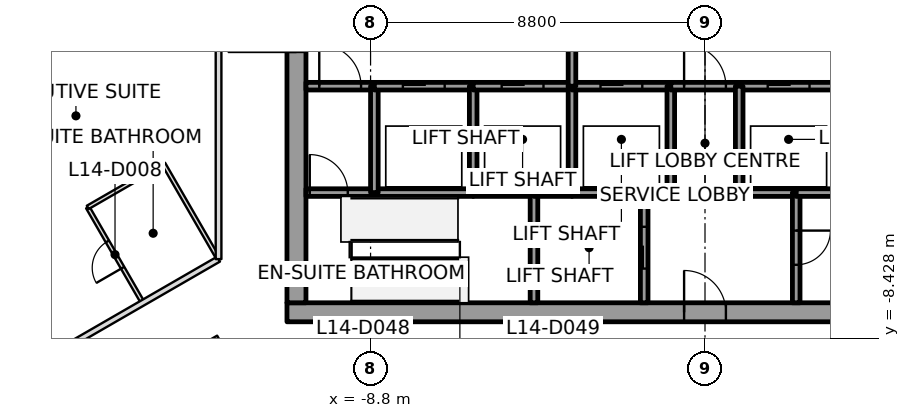
"""IFC4 building model, lengths in metres.
Left out: names, types, materials, properties, quantities, classifications, styles, units other than length and angle.
Written with IfcOpenShell. Run it as: python <this file> out.ifc"""

import sys

from ifc_helpers import new_model, si_unit, direction, frame, frame_2d, origin, place, context, subcontext, project, spatial, rectangle, extrude, element, fill, save


model = new_model("IFC4")
c1 = context("Model", 3, precision=1e-05, world=origin(), true_north=direction((0.0, 1.0)))
c2 = subcontext(c1, "Body", "Model", "MODEL_VIEW")
j1 = project(units=[si_unit("LENGTHUNIT", "METRE"), si_unit("PLANEANGLEUNIT", "RADIAN")], contexts=[c1])
p1 = place(None, origin())
s1 = spatial("IfcSite", under=j1, at=p1, CompositionType="ELEMENT")
p2 = place(p1, origin())
s2 = spatial("IfcBuilding", under=s1, at=p2, CompositionType="ELEMENT")
p3 = place(p2, frame((0.0, 0.0, 73.9)))
s3 = spatial("IfcBuildingStorey", under=s2, at=p3, CompositionType="ELEMENT", Elevation=73.9)
p4 = place(p3, frame((-11.0, -7.75, 0.0), z_axis=(0.0, 0.0, 1.0), x_axis=(1.0, 0.0, 0.0)))
e1 = element("IfcWall", 1, at=p4, inside=s3, PredefinedType="SHEAR", context=c2, shape_type="SweptSolid", body=[
    extrude(rectangle(XDim=22.0, YDim=0.5, at=frame_2d((11.0, 0.0))), origin(), (0.0, 0.0, 1.0), 3.7),
])
p5 = place(p4, frame((10.45, 0.0, 0.0)))
e2 = element("IfcOpeningElement", 2, at=p5, cuts=e1, PredefinedType="OPENING", context=c2, shape_type="SweptSolid", body=[
    extrude(rectangle(XDim=1.1, YDim=2.1, at=frame_2d((0.55, 1.05))), frame((0.0, 0.25, 0.0), z_axis=(0.0, -1.0, 0.0), x_axis=(1.0, 0.0, 0.0)), (0.0, 0.0, 1.0), 0.5),
])
p6 = place(p3, frame((-10.75, -7.5, 0.0), z_axis=(0.0, 0.0, 1.0), x_axis=(0.0, 1.0, 0.0)))
e3 = element("IfcWall", 3, at=p6, inside=s3, PredefinedType="SHEAR", context=c2, shape_type="SweptSolid", body=[
    extrude(rectangle(XDim=15.0, YDim=0.5, at=frame_2d((7.5, 0.0))), origin(), (0.0, 0.0, 1.0), 3.7),
])
p7 = place(p6, frame((6.6, 0.0, 0.0)))
e4 = element("IfcOpeningElement", 4, at=p7, cuts=e3, PredefinedType="OPENING", context=c2, shape_type="SweptSolid", body=[
    extrude(rectangle(XDim=1.8, YDim=2.1, at=frame_2d((0.9, 1.05))), frame((0.0, 0.25, 0.0), z_axis=(0.0, -1.0, 0.0), x_axis=(1.0, 0.0, 0.0)), (0.0, 0.0, 1.0), 0.5),
])
p8 = place(p3, frame((-10.5, -4.6, 0.0), z_axis=(0.0, 0.0, 1.0), x_axis=(1.0, 0.0, 0.0)))
e5 = element("IfcWall", 5, at=p8, inside=s3, PredefinedType="SOLIDWALL", context=c2, shape_type="SweptSolid", body=[
    extrude(rectangle(XDim=1.8, YDim=0.2, at=frame_2d((0.9, 0.0))), origin(), (0.0, 0.0, 1.0), 3.55),
])
p9 = place(p8, frame((0.1, 0.0, 0.0)))
e6 = element("IfcOpeningElement", 6, at=p9, cuts=e5, PredefinedType="OPENING", context=c2, shape_type="SweptSolid", body=[
    extrude(rectangle(XDim=1.0, YDim=2.1, at=frame_2d((0.5, 1.05))), frame((0.0, 0.1, 0.0), z_axis=(0.0, -1.0, 0.0), x_axis=(1.0, 0.0, 0.0)), (0.0, 0.0, 1.0), 0.2),
])
p10 = place(p3, frame((-10.5, -1.8, 0.0), z_axis=(0.0, 0.0, 1.0), x_axis=(1.0, 0.0, 0.0)))
e7 = element("IfcWall", 7, at=p10, inside=s3, PredefinedType="SOLIDWALL", context=c2, shape_type="SweptSolid", body=[
    extrude(rectangle(XDim=1.8, YDim=0.2, at=frame_2d((0.9, 0.0))), origin(), (0.0, 0.0, 1.0), 3.55),
])
p11 = place(p10, frame((0.35, 0.0, 0.0)))
e8 = element("IfcOpeningElement", 8, at=p11, cuts=e7, PredefinedType="OPENING", context=c2, shape_type="SweptSolid", body=[
    extrude(rectangle(XDim=1.1, YDim=2.1, at=frame_2d((0.55, 1.05))), frame((0.0, 0.1, 0.0), z_axis=(0.0, -1.0, 0.0), x_axis=(1.0, 0.0, 0.0)), (0.0, 0.0, 1.0), 0.2),
])
p12 = place(p3, frame((-8.7, -4.6, 0.0), z_axis=(0.0, 0.0, 1.0), x_axis=(1.0, 0.0, 0.0)))
e9 = element("IfcWall", 9, at=p12, inside=s3, PredefinedType="SOLIDWALL", context=c2, shape_type="SweptSolid", body=[
    extrude(rectangle(XDim=2.6, YDim=0.2, at=frame_2d((1.3, 0.0))), origin(), (0.0, 0.0, 1.0), 3.55),
])
p13 = place(p3, frame((-8.7, -4.6, 0.0), z_axis=(0.0, 0.0, 1.0), x_axis=(0.0, 1.0, 0.0)))
e10 = element("IfcWall", 10, at=p13, inside=s3, PredefinedType="SOLIDWALL", context=c2, shape_type="SweptSolid", body=[
    extrude(rectangle(XDim=2.8, YDim=0.2, at=frame_2d((1.4, 0.0))), origin(), (0.0, 0.0, 1.0), 3.55),
])
p14 = place(p3, frame((-8.7, -1.8, 0.0), z_axis=(0.0, 0.0, 1.0), x_axis=(1.0, 0.0, 0.0)))
e11 = element("IfcWall", 11, at=p14, inside=s3, PredefinedType="SOLIDWALL", context=c2, shape_type="SweptSolid", body=[
    extrude(rectangle(XDim=2.6, YDim=0.2, at=frame_2d((1.3, 0.0))), origin(), (0.0, 0.0, 1.0), 3.55),
])
p15 = place(p14, frame((0.75, 0.0, 0.0)))
e12 = element("IfcOpeningElement", 12, at=p15, cuts=e11, PredefinedType="OPENING", context=c2, shape_type="SweptSolid", body=[
    extrude(rectangle(XDim=1.1, YDim=2.1, at=frame_2d((0.55, 1.05))), frame((0.0, 0.1, 0.0), z_axis=(0.0, -1.0, 0.0), x_axis=(1.0, 0.0, 0.0)), (0.0, 0.0, 1.0), 0.2),
])
p16 = place(p3, frame((-6.1, -4.6, 0.0), z_axis=(0.0, 0.0, 1.0), x_axis=(1.0, 0.0, 0.0)))
e13 = element("IfcWall", 13, at=p16, inside=s3, PredefinedType="SOLIDWALL", context=c2, shape_type="SweptSolid", body=[
    extrude(rectangle(XDim=1.6, YDim=0.2, at=frame_2d((0.8, 0.0))), origin(), (0.0, 0.0, 1.0), 3.55),
])
p17 = place(p3, frame((-6.1, -4.6, 0.0), z_axis=(0.0, 0.0, 1.0), x_axis=(0.0, 1.0, 0.0)))
e14 = element("IfcWall", 14, at=p17, inside=s3, PredefinedType="SOLIDWALL", context=c2, shape_type="SweptSolid", body=[
    extrude(rectangle(XDim=2.8, YDim=0.2, at=frame_2d((1.4, 0.0))), origin(), (0.0, 0.0, 1.0), 3.55),
])
p18 = place(p3, frame((-6.1, -1.8, 0.0), z_axis=(0.0, 0.0, 1.0), x_axis=(1.0, 0.0, 0.0)))
e15 = element("IfcWall", 15, at=p18, inside=s3, PredefinedType="SOLIDWALL", context=c2, shape_type="SweptSolid", body=[
    extrude(rectangle(XDim=2.6, YDim=0.2, at=frame_2d((1.3, 0.0))), origin(), (0.0, 0.0, 1.0), 3.55),
])
p19 = place(p18, frame((0.75, 0.0, 0.0)))
e16 = element("IfcOpeningElement", 16, at=p19, cuts=e15, PredefinedType="OPENING", context=c2, shape_type="SweptSolid", body=[
    extrude(rectangle(XDim=1.1, YDim=2.1, at=frame_2d((0.55, 1.05))), frame((0.0, 0.1, 0.0), z_axis=(0.0, -1.0, 0.0), x_axis=(1.0, 0.0, 0.0)), (0.0, 0.0, 1.0), 0.2),
])
p20 = place(p3, frame((-4.5, -4.6, 0.0), z_axis=(0.0, 0.0, 1.0), x_axis=(0.0, -1.0, 0.0)))
e17 = element("IfcWall", 17, at=p20, inside=s3, PredefinedType="SOLIDWALL", context=c2, shape_type="SweptSolid", body=[
    extrude(rectangle(XDim=2.9, YDim=0.2, at=frame_2d((1.45, 0.0))), origin(), (0.0, 0.0, 1.0), 3.55),
])
p21 = place(p3, frame((-4.5, -4.6, 0.0), z_axis=(0.0, 0.0, 1.0), x_axis=(1.0, 0.0, 0.0)))
e18 = element("IfcWall", 18, at=p21, inside=s3, PredefinedType="SOLIDWALL", context=c2, shape_type="SweptSolid", body=[
    extrude(rectangle(XDim=1.0, YDim=0.2, at=frame_2d((0.5, 0.0))), origin(), (0.0, 0.0, 1.0), 3.55),
])
p22 = place(p3, frame((-3.5, -4.6, 0.0), z_axis=(0.0, 0.0, 1.0), x_axis=(1.0, 0.0, 0.0)))
e19 = element("IfcWall", 19, at=p22, inside=s3, PredefinedType="SOLIDWALL", context=c2, shape_type="SweptSolid", body=[
    extrude(rectangle(XDim=1.9, YDim=0.2, at=frame_2d((0.95, 0.0))), origin(), (0.0, 0.0, 1.0), 3.55),
])
p23 = place(p3, frame((-3.5, -4.6, 0.0), z_axis=(0.0, 0.0, 1.0), x_axis=(0.0, 1.0, 0.0)))
e20 = element("IfcWall", 20, at=p23, inside=s3, PredefinedType="SOLIDWALL", context=c2, shape_type="SweptSolid", body=[
    extrude(rectangle(XDim=2.8, YDim=0.2, at=frame_2d((1.4, 0.0))), origin(), (0.0, 0.0, 1.0), 3.55),
])
p24 = place(p3, frame((-3.5, -1.8, 0.0), z_axis=(0.0, 0.0, 1.0), x_axis=(1.0, 0.0, 0.0)))
e21 = element("IfcWall", 21, at=p24, inside=s3, PredefinedType="SOLIDWALL", context=c2, shape_type="SweptSolid", body=[
    extrude(rectangle(XDim=2.6, YDim=0.2, at=frame_2d((1.3, 0.0))), origin(), (0.0, 0.0, 1.0), 3.55),
])
p25 = place(p24, frame((0.75, 0.0, 0.0)))
e22 = element("IfcOpeningElement", 22, at=p25, cuts=e21, PredefinedType="OPENING", context=c2, shape_type="SweptSolid", body=[
    extrude(rectangle(XDim=1.1, YDim=2.1, at=frame_2d((0.55, 1.05))), frame((0.0, 0.1, 0.0), z_axis=(0.0, -1.0, 0.0), x_axis=(1.0, 0.0, 0.0)), (0.0, 0.0, 1.0), 0.2),
])
p26 = place(p3, frame((-3.5, 1.8, 0.0), z_axis=(0.0, 0.0, 1.0), x_axis=(0.0, -1.0, 0.0)))
e23 = element("IfcWall", 23, at=p26, inside=s3, PredefinedType="SOLIDWALL", context=c2, shape_type="SweptSolid", body=[
    extrude(rectangle(XDim=3.6, YDim=0.2, at=frame_2d((1.8, 0.0))), origin(), (0.0, 0.0, 1.0), 3.55),
])
p27 = place(p26, frame((1.05, 0.0, 0.0)))
e24 = element("IfcOpeningElement", 24, at=p27, cuts=e23, PredefinedType="OPENING", context=c2, shape_type="SweptSolid", body=[
    extrude(rectangle(XDim=1.5, YDim=2.1, at=frame_2d((0.75, 1.05))), frame((0.0, 0.1, 0.0), z_axis=(0.0, -1.0, 0.0), x_axis=(1.0, 0.0, 0.0)), (0.0, 0.0, 1.0), 0.2),
])
p28 = place(p3, frame((-1.6, -7.5, 0.0), z_axis=(0.0, 0.0, 1.0), x_axis=(0.0, 1.0, 0.0)))
e25 = element("IfcWall", 25, at=p28, inside=s3, PredefinedType="SOLIDWALL", context=c2, shape_type="SweptSolid", body=[
    extrude(rectangle(XDim=2.9, YDim=0.2, at=frame_2d((1.45, 0.0))), origin(), (0.0, 0.0, 1.0), 3.55),
])
p29 = place(p28, frame((0.9, 0.0, 0.0)))
e26 = element("IfcOpeningElement", 26, at=p29, cuts=e25, PredefinedType="OPENING", context=c2, shape_type="SweptSolid", body=[
    extrude(rectangle(XDim=1.1, YDim=2.1, at=frame_2d((0.55, 1.05))), frame((0.0, 0.1, 0.0), z_axis=(0.0, -1.0, 0.0), x_axis=(1.0, 0.0, 0.0)), (0.0, 0.0, 1.0), 0.2),
])
p30 = place(p3, frame((-1.6, -4.6, 0.0), z_axis=(0.0, 0.0, 1.0), x_axis=(1.0, 0.0, 0.0)))
e27 = element("IfcWall", 27, at=p30, inside=s3, PredefinedType="SOLIDWALL", context=c2, shape_type="SweptSolid", body=[
    extrude(rectangle(XDim=0.7, YDim=0.2, at=frame_2d((0.35, 0.0))), origin(), (0.0, 0.0, 1.0), 3.55),
])
p31 = place(p3, frame((-0.9, -4.6, 0.0), z_axis=(0.0, 0.0, 1.0), x_axis=(0.0, 1.0, 0.0)))
e28 = element("IfcWall", 28, at=p31, inside=s3, PredefinedType="SOLIDWALL", context=c2, shape_type="SweptSolid", body=[
    extrude(rectangle(XDim=2.8, YDim=0.2, at=frame_2d((1.4, 0.0))), origin(), (0.0, 0.0, 1.0), 3.55),
])
p32 = place(p3, frame((-0.9, -1.8, 0.0), z_axis=(0.0, 0.0, 1.0), x_axis=(1.0, 0.0, 0.0)))
e29 = element("IfcWall", 29, at=p32, inside=s3, PredefinedType="SOLIDWALL", context=c2, shape_type="SweptSolid", body=[
    extrude(rectangle(XDim=1.8, YDim=0.2, at=frame_2d((0.9, 0.0))), origin(), (0.0, 0.0, 1.0), 3.55),
])
p33 = place(p32, frame((0.35, 0.0, 0.0)))
e30 = element("IfcOpeningElement", 30, at=p33, cuts=e29, PredefinedType="OPENING", context=c2, shape_type="SweptSolid", body=[
    extrude(rectangle(XDim=1.1, YDim=2.1, at=frame_2d((0.55, 1.05))), frame((0.0, 0.1, 0.0), z_axis=(0.0, -1.0, 0.0), x_axis=(1.0, 0.0, 0.0)), (0.0, 0.0, 1.0), 0.2),
])
p34 = place(p3, frame((0.9, -1.8, 0.0), z_axis=(0.0, 0.0, 1.0), x_axis=(1.0, 0.0, 0.0)))
e31 = element("IfcWall", 31, at=p34, inside=s3, PredefinedType="SOLIDWALL", context=c2, shape_type="SweptSolid", body=[
    extrude(rectangle(XDim=2.6, YDim=0.2, at=frame_2d((1.3, 0.0))), origin(), (0.0, 0.0, 1.0), 3.55),
])
p35 = place(p34, frame((0.75, 0.0, 0.0)))
e32 = element("IfcOpeningElement", 32, at=p35, cuts=e31, PredefinedType="OPENING", context=c2, shape_type="SweptSolid", body=[
    extrude(rectangle(XDim=1.1, YDim=2.1, at=frame_2d((0.55, 1.05))), frame((0.0, 0.1, 0.0), z_axis=(0.0, -1.0, 0.0), x_axis=(1.0, 0.0, 0.0)), (0.0, 0.0, 1.0), 0.2),
])
p36 = place(p3, frame((0.9, -1.8, 0.0), z_axis=(0.0, 0.0, 1.0), x_axis=(0.0, -1.0, 0.0)))
e33 = element("IfcWall", 33, at=p36, inside=s3, PredefinedType="SOLIDWALL", context=c2, shape_type="SweptSolid", body=[
    extrude(rectangle(XDim=2.8, YDim=0.2, at=frame_2d((1.4, 0.0))), origin(), (0.0, 0.0, 1.0), 3.55),
])
p37 = place(p3, frame((0.9, -4.6, 0.0), z_axis=(0.0, 0.0, 1.0), x_axis=(1.0, 0.0, 0.0)))
e34 = element("IfcWall", 34, at=p37, inside=s3, PredefinedType="SOLIDWALL", context=c2, shape_type="SweptSolid", body=[
    extrude(rectangle(XDim=1.5, YDim=0.2, at=frame_2d((0.75, 0.0))), origin(), (0.0, 0.0, 1.0), 3.55),
])
p38 = place(p3, frame((2.4, -4.6, 0.0), z_axis=(0.0, 0.0, 1.0), x_axis=(0.0, -1.0, 0.0)))
e35 = element("IfcWall", 35, at=p38, inside=s3, PredefinedType="SOLIDWALL", context=c2, shape_type="SweptSolid", body=[
    extrude(rectangle(XDim=2.9, YDim=0.2, at=frame_2d((1.45, 0.0))), origin(), (0.0, 0.0, 1.0), 3.55),
])
p39 = place(p38, frame((1.0, 0.0, 0.0)))
e36 = element("IfcOpeningElement", 36, at=p39, cuts=e35, PredefinedType="OPENING", context=c2, shape_type="SweptSolid", body=[
    extrude(rectangle(XDim=0.9, YDim=2.1, at=frame_2d((0.45, 1.05))), frame((0.0, 0.1, 0.0), z_axis=(0.0, -1.0, 0.0), x_axis=(1.0, 0.0, 0.0)), (0.0, 0.0, 1.0), 0.2),
])
p40 = place(p3, frame((3.5, -4.6, 0.0), z_axis=(0.0, 0.0, 1.0), x_axis=(-1.0, 0.0, 0.0)))
e37 = element("IfcWall", 37, at=p40, inside=s3, PredefinedType="SOLIDWALL", context=c2, shape_type="SweptSolid", body=[
    extrude(rectangle(XDim=1.1, YDim=0.2, at=frame_2d((0.55, 0.0))), origin(), (0.0, 0.0, 1.0), 3.55),
])
p41 = place(p3, frame((-12.8, -6.351, 0.0), z_axis=(0.0, 0.0, 1.0), x_axis=(-0.866020449901, -0.50000858028, 0.0)))
e38 = element("IfcWall", 38, at=p41, inside=s3, PredefinedType="PARTITIONING", context=c2, shape_type="SweptSolid", body=[
    extrude(rectangle(XDim=12.581, YDim=0.15, at=frame_2d((6.291, 0.0))), origin(), (0.0, 0.0, 1.0), 2.947),
])
p42 = place(p41, frame((6.99, 0.0, 0.0)))
e39 = element("IfcOpeningElement", 39, at=p42, cuts=e38, PredefinedType="OPENING", context=c2, shape_type="SweptSolid", body=[
    extrude(rectangle(XDim=1.0, YDim=2.1, at=frame_2d((0.5, 1.05))), frame((0.0, 0.075, 0.0), z_axis=(0.0, -1.0, 0.0), x_axis=(1.0, 0.0, 0.0)), (0.0, 0.0, 1.0), 0.15),
])
p43 = place(p3, frame((-22.726, -14.16, 0.0), z_axis=(0.0, 0.0, 1.0), x_axis=(0.866019223041, 0.500010705209, 0.0)))
e40 = element("IfcWall", 40, at=p43, inside=s3, PredefinedType="PARTITIONING", context=c2, shape_type="SweptSolid", body=[
    extrude(rectangle(XDim=11.462, YDim=0.15, at=frame_2d((5.731, 0.0))), origin(), (0.0, 0.0, 1.0), 2.797),
])
p44 = place(p43, frame((2.791, 0.0, 0.0)))
e41 = element("IfcOpeningElement", 41, at=p44, cuts=e40, PredefinedType="OPENING", context=c2, shape_type="SweptSolid", body=[
    extrude(rectangle(XDim=1.0, YDim=2.1, at=frame_2d((0.5, 1.05))), frame((0.0, 0.075, 0.0), z_axis=(0.0, -1.0, 0.0), x_axis=(1.0, 0.0, 0.0)), (0.0, 0.0, 1.0), 0.15),
])
p45 = place(p3, frame((-12.8, 9.72, 0.0), z_axis=(0.0, 0.0, 1.0), x_axis=(0.0, -1.0, 0.0)))
e42 = element("IfcWall", 42, at=p45, inside=s3, PredefinedType="PARTITIONING", context=c2, shape_type="SweptSolid", body=[
    extrude(rectangle(XDim=16.071, YDim=0.15, at=frame_2d((8.035, 0.0))), origin(), (0.0, 0.0, 1.0), 2.947),
])
p46 = place(p45, frame((3.595, 0.0, 0.0)))
e43 = element("IfcOpeningElement", 43, at=p46, cuts=e42, PredefinedType="OPENING", context=c2, shape_type="SweptSolid", body=[
    extrude(rectangle(XDim=1.0, YDim=2.1, at=frame_2d((0.5, 1.05))), frame((0.0, 0.075, 0.0), z_axis=(0.0, -1.0, 0.0), x_axis=(1.0, 0.0, 0.0)), (0.0, 0.0, 1.0), 0.15),
])
p47 = place(p3, frame((-14.807, -7.475, 0.0), z_axis=(0.0, 0.0, 1.0), x_axis=(-0.500036638401, 0.866004249561, 0.0)))
e44 = element("IfcWall", 44, at=p47, inside=s3, PredefinedType="PARTITIONING", context=c2, shape_type="SweptSolid", body=[
    extrude(rectangle(XDim=2.87, YDim=0.1, at=frame_2d((1.435, 0.0))), origin(), (0.0, 0.0, 1.0), 3.15),
])
p48 = place(p47, frame((1.035, 0.0, 0.0)))
e45 = element("IfcOpeningElement", 45, at=p48, cuts=e44, PredefinedType="OPENING", context=c2, shape_type="SweptSolid", body=[
    extrude(rectangle(XDim=0.8, YDim=2.1, at=frame_2d((0.4, 1.05))), frame((0.0, 0.05, 0.0), z_axis=(0.0, -1.0, 0.0), x_axis=(1.0, 0.0, 0.0)), (0.0, 0.0, 1.0), 0.1),
])
p49 = place(p3, frame((-16.242, -4.99, 0.0), z_axis=(0.0, 0.0, 1.0), x_axis=(0.866007057882, 0.500031774688, 0.0)))
e46 = element("IfcWall", 46, at=p49, inside=s3, PredefinedType="PARTITIONING", context=c2, shape_type="SweptSolid", body=[
    extrude(rectangle(XDim=2.3, YDim=0.1, at=frame_2d((1.15, 0.0))), origin(), (0.0, 0.0, 1.0), 2.947),
])
p50 = place(p3, frame((-14.25, -3.839, 0.0), z_axis=(0.0, 0.0, 1.0), x_axis=(0.499985389037, -0.866033839264, 0.0)))
e47 = element("IfcWall", 47, at=p50, inside=s3, PredefinedType="PARTITIONING", context=c2, shape_type="SweptSolid", body=[
    extrude(rectangle(XDim=2.84, YDim=0.1, at=frame_2d((1.42, 0.0))), origin(), (0.0, 0.0, 1.0), 2.947),
])
p51 = place(p48, origin())
e48 = element("IfcDoor", 48, at=p51, inside=s3, OperationType="SINGLE_SWING_RIGHT", PredefinedType="DOOR", context=c2, shape_type="SweptSolid", body=[
    extrude(rectangle(XDim=0.8, YDim=2.1, at=frame_2d((0.4, 1.05))), frame((0.0, 0.025, 0.0), z_axis=(0.0, -1.0, 0.0), x_axis=(1.0, 0.0, 0.0)), (0.0, 0.0, 1.0), 0.05),
])
fill(e45, e48)
p52 = place(p15, origin())
e49 = element("IfcDoor", 49, at=p52, inside=s3, OperationType="SLIDING_TO_LEFT", PredefinedType="DOOR", context=c2, shape_type="SweptSolid", body=[
    extrude(rectangle(XDim=1.1, YDim=2.1, at=frame_2d((0.55, 1.05))), frame((0.0, 0.025, 0.0), z_axis=(0.0, -1.0, 0.0), x_axis=(1.0, 0.0, 0.0)), (0.0, 0.0, 1.0), 0.05),
])
fill(e12, e49)
p53 = place(p19, origin())
e50 = element("IfcDoor", 50, at=p53, inside=s3, OperationType="SLIDING_TO_LEFT", PredefinedType="DOOR", context=c2, shape_type="SweptSolid", body=[
    extrude(rectangle(XDim=1.1, YDim=2.1, at=frame_2d((0.55, 1.05))), frame((0.0, 0.025, 0.0), z_axis=(0.0, -1.0, 0.0), x_axis=(1.0, 0.0, 0.0)), (0.0, 0.0, 1.0), 0.05),
])
fill(e16, e50)
p54 = place(p25, origin())
e51 = element("IfcDoor", 51, at=p54, inside=s3, OperationType="SLIDING_TO_LEFT", PredefinedType="DOOR", context=c2, shape_type="SweptSolid", body=[
    extrude(rectangle(XDim=1.1, YDim=2.1, at=frame_2d((0.55, 1.05))), frame((0.0, 0.025, 0.0), z_axis=(0.0, -1.0, 0.0), x_axis=(1.0, 0.0, 0.0)), (0.0, 0.0, 1.0), 0.05),
])
fill(e22, e51)
p55 = place(p35, origin())
e52 = element("IfcDoor", 52, at=p55, inside=s3, OperationType="SLIDING_TO_LEFT", PredefinedType="DOOR", context=c2, shape_type="SweptSolid", body=[
    extrude(rectangle(XDim=1.1, YDim=2.1, at=frame_2d((0.55, 1.05))), frame((0.0, 0.025, 0.0), z_axis=(0.0, -1.0, 0.0), x_axis=(1.0, 0.0, 0.0)), (0.0, 0.0, 1.0), 0.05),
])
fill(e32, e52)
p56 = place(p29, origin())
e53 = element("IfcDoor", 53, at=p56, inside=s3, OperationType="SLIDING_TO_LEFT", PredefinedType="DOOR", context=c2, shape_type="SweptSolid", body=[
    extrude(rectangle(XDim=1.1, YDim=2.1, at=frame_2d((0.55, 1.05))), frame((0.0, 0.025, 0.0), z_axis=(0.0, -1.0, 0.0), x_axis=(1.0, 0.0, 0.0)), (0.0, 0.0, 1.0), 0.05),
])
fill(e26, e53)
p57 = place(p11, origin())
e54 = element("IfcDoor", 54, at=p57, inside=s3, OperationType="SINGLE_SWING_LEFT", PredefinedType="DOOR", context=c2, shape_type="SweptSolid", body=[
    extrude(rectangle(XDim=1.1, YDim=2.1, at=frame_2d((0.55, 1.05))), frame((0.0, 0.025, 0.0), z_axis=(0.0, -1.0, 0.0), x_axis=(1.0, 0.0, 0.0)), (0.0, 0.0, 1.0), 0.05),
])
fill(e8, e54)
p58 = place(p33, origin())
e55 = element("IfcDoor", 55, at=p58, inside=s3, OperationType="SINGLE_SWING_RIGHT", PredefinedType="DOOR", context=c2, shape_type="SweptSolid", body=[
    extrude(rectangle(XDim=1.1, YDim=2.1, at=frame_2d((0.55, 1.05))), frame((0.0, 0.025, 0.0), z_axis=(0.0, -1.0, 0.0), x_axis=(1.0, 0.0, 0.0)), (0.0, 0.0, 1.0), 0.05),
])
fill(e30, e55)
p59 = place(p9, origin())
e56 = element("IfcDoor", 56, at=p59, inside=s3, OperationType="SINGLE_SWING_LEFT", PredefinedType="DOOR", context=c2, shape_type="SweptSolid", body=[
    extrude(rectangle(XDim=1.0, YDim=2.1, at=frame_2d((0.5, 1.05))), frame((0.0, 0.025, 0.0), z_axis=(0.0, -1.0, 0.0), x_axis=(1.0, 0.0, 0.0)), (0.0, 0.0, 1.0), 0.05),
])
fill(e6, e56)
p60 = place(p39, origin())
e57 = element("IfcDoor", 57, at=p60, inside=s3, OperationType="SINGLE_SWING_LEFT", PredefinedType="DOOR", context=c2, shape_type="SweptSolid", body=[
    extrude(rectangle(XDim=0.9, YDim=2.1, at=frame_2d((0.45, 1.05))), frame((0.0, 0.025, 0.0), z_axis=(0.0, -1.0, 0.0), x_axis=(1.0, 0.0, 0.0)), (0.0, 0.0, 1.0), 0.05),
])
fill(e36, e57)
p61 = place(p7, origin())
e58 = element("IfcDoor", 58, at=p61, inside=s3, OperationType="DOUBLE_DOOR_SINGLE_SWING", PredefinedType="DOOR", context=c2, shape_type="SweptSolid", body=[
    extrude(rectangle(XDim=1.8, YDim=2.1, at=frame_2d((0.9, 1.05))), frame((0.0, 0.025, 0.0), z_axis=(0.0, -1.0, 0.0), x_axis=(1.0, 0.0, 0.0)), (0.0, 0.0, 1.0), 0.05),
])
fill(e4, e58)
p62 = place(p5, origin())
e59 = element("IfcDoor", 59, at=p62, inside=s3, OperationType="SINGLE_SWING_RIGHT", PredefinedType="DOOR", context=c2, shape_type="SweptSolid", body=[
    extrude(rectangle(XDim=1.1, YDim=2.1, at=frame_2d((0.55, 1.05))), frame((0.0, 0.025, 0.0), z_axis=(0.0, -1.0, 0.0), x_axis=(1.0, 0.0, 0.0)), (0.0, 0.0, 1.0), 0.05),
])
fill(e2, e59)
save(model, sys.argv[1])
